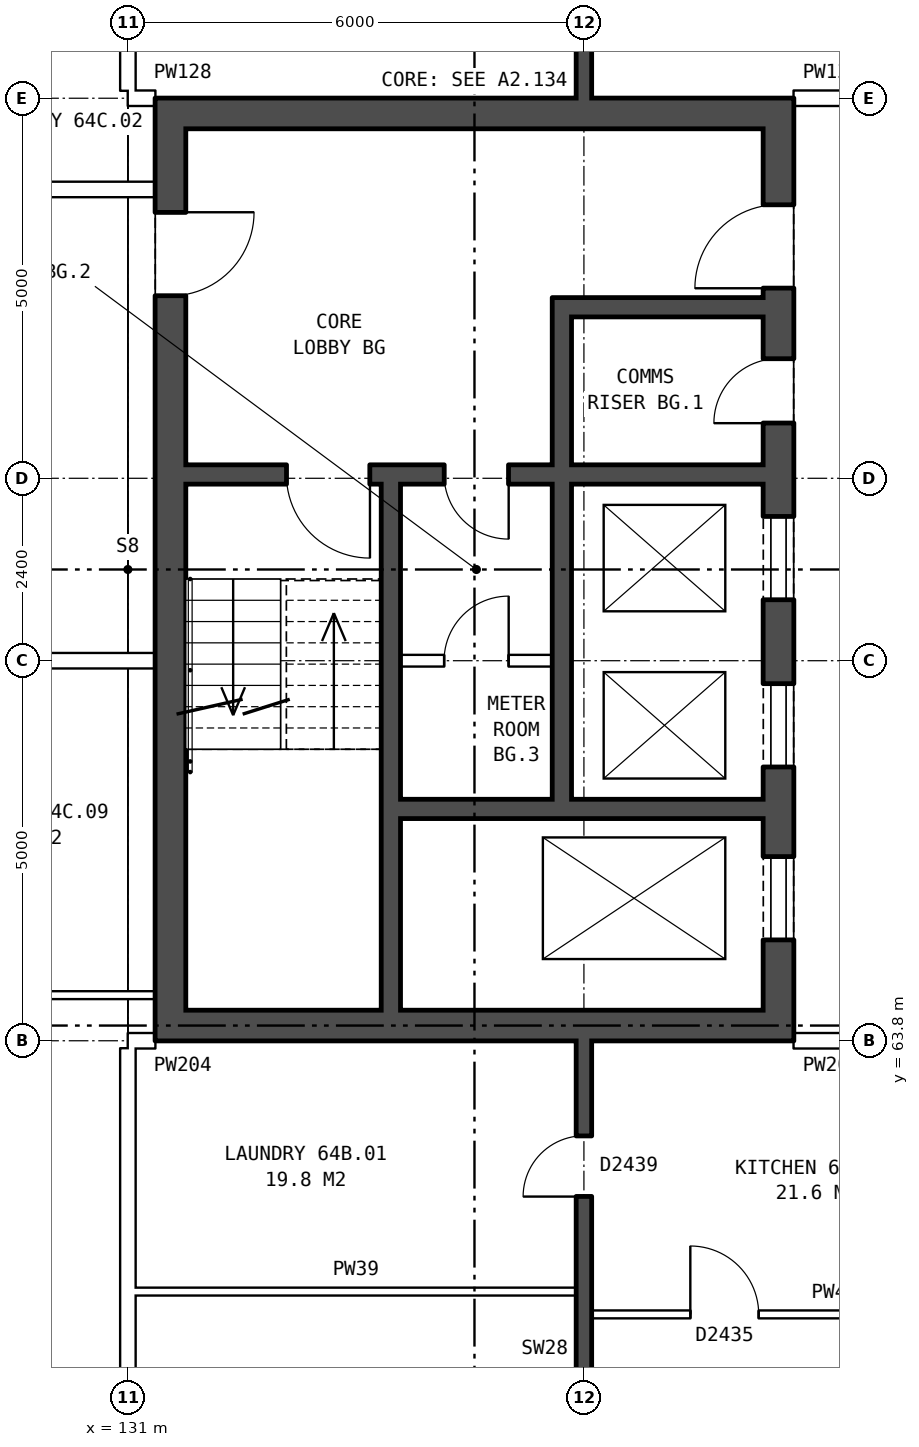
"""IFC4 building model, lengths in metres.
Left out: names, types, materials, properties, quantities, classifications, styles, units other than length and angle.
Written with IfcOpenShell. Run it as: python <this file> out.ifc"""

import sys

from ifc_helpers import new_model, si_unit, direction, frame, frame_2d, origin, place, context, subcontext, project, spatial, rectangle, extrude, element, fill, save


model = new_model("IFC4")
c1 = context("Model", 3, precision=1e-05, world=origin(), true_north=direction((0.0, 1.0)))
c2 = subcontext(c1, "Body", "Model", "MODEL_VIEW")
j1 = project(units=[si_unit("LENGTHUNIT", "METRE"), si_unit("PLANEANGLEUNIT", "RADIAN")], contexts=[c1])
p1 = place(None, origin())
s1 = spatial("IfcSite", under=j1, at=p1, CompositionType="ELEMENT")
p2 = place(p1, origin())
s2 = spatial("IfcBuilding", under=s1, at=p2, CompositionType="ELEMENT")
p3 = place(p2, frame((0.0, 0.0, 227.6)))
s3 = spatial("IfcBuildingStorey", under=s2, at=p3, CompositionType="ELEMENT", Elevation=227.6)
p4 = place(p3, frame((139.56, 63.8, 0.0), z_axis=(0.0, 0.0, 1.0), x_axis=(0.0, 1.0, 0.0)))
e1 = element("IfcWall", 1, at=p4, inside=s3, PredefinedType="SHEAR", context=c2, shape_type="SweptSolid", body=[
    extrude(rectangle(XDim=12.4, YDim=0.4, at=frame_2d((6.2, 0.0))), origin(), (0.0, 0.0, 1.0), 2.85),
])
p5 = place(p4, frame((1.325, 0.0, 0.0)))
e2 = element("IfcOpeningElement", 2, at=p5, cuts=e1, PredefinedType="OPENING", context=c2, shape_type="SweptSolid", body=[
    extrude(rectangle(XDim=1.1, YDim=2.1, at=frame_2d((0.55, 1.05))), frame((0.0, 0.21, 0.0), z_axis=(0.0, -1.0, 0.0), x_axis=(1.0, 0.0, 0.0)), (0.0, 0.0, 1.0), 0.42),
])
p6 = place(p4, frame((3.6, 0.0, 0.0)))
e3 = element("IfcOpeningElement", 3, at=p6, cuts=e1, PredefinedType="OPENING", context=c2, shape_type="SweptSolid", body=[
    extrude(rectangle(XDim=1.1, YDim=2.1, at=frame_2d((0.55, 1.05))), frame((0.0, 0.21, 0.0), z_axis=(0.0, -1.0, 0.0), x_axis=(1.0, 0.0, 0.0)), (0.0, 0.0, 1.0), 0.42),
])
p7 = place(p4, frame((5.8, 0.0, 0.0)))
e4 = element("IfcOpeningElement", 4, at=p7, cuts=e1, PredefinedType="OPENING", context=c2, shape_type="SweptSolid", body=[
    extrude(rectangle(XDim=1.1, YDim=2.1, at=frame_2d((0.55, 1.05))), frame((0.0, 0.21, 0.0), z_axis=(0.0, -1.0, 0.0), x_axis=(1.0, 0.0, 0.0)), (0.0, 0.0, 1.0), 0.42),
])
p8 = place(p4, frame((9.9, 0.0, 0.0)))
e5 = element("IfcOpeningElement", 5, at=p8, cuts=e1, PredefinedType="OPENING", context=c2, shape_type="SweptSolid", body=[
    extrude(rectangle(XDim=1.1, YDim=2.1, at=frame_2d((0.55, 1.05))), frame((0.0, 0.21, 0.0), z_axis=(0.0, -1.0, 0.0), x_axis=(1.0, 0.0, 0.0)), (0.0, 0.0, 1.0), 0.42),
])
p9 = place(p4, frame((8.125, 0.0, 0.0)))
e6 = element("IfcOpeningElement", 6, at=p9, cuts=e1, PredefinedType="OPENING", context=c2, shape_type="SweptSolid", body=[
    extrude(rectangle(XDim=0.85, YDim=2.1, at=frame_2d((0.425, 1.05))), frame((0.0, 0.21, 0.0), z_axis=(0.0, -1.0, 0.0), x_axis=(1.0, 0.0, 0.0)), (0.0, 0.0, 1.0), 0.42),
])
p10 = place(p3, frame((131.56, 63.8, 0.0), z_axis=(0.0, 0.0, 1.0), x_axis=(0.0, 1.0, 0.0)))
e7 = element("IfcWall", 7, at=p10, inside=s3, PredefinedType="SHEAR", context=c2, shape_type="SweptSolid", body=[
    extrude(rectangle(XDim=12.4, YDim=0.4, at=frame_2d((6.2, 0.0))), origin(), (0.0, 0.0, 1.0), 2.85),
])
p11 = place(p10, frame((9.8, 0.0, 0.0)))
e8 = element("IfcOpeningElement", 8, at=p11, cuts=e7, PredefinedType="OPENING", context=c2, shape_type="SweptSolid", body=[
    extrude(rectangle(XDim=1.1, YDim=2.1, at=frame_2d((0.55, 1.05))), frame((0.0, 0.21, 0.0), z_axis=(0.0, -1.0, 0.0), x_axis=(1.0, 0.0, 0.0)), (0.0, 0.0, 1.0), 0.42),
])
for number, where, z_axis, x_axis in (
    (9, (139.36, 64.0, 0.0), (0.0, 0.0, 1.0), (-1.0, 0.0, 0.0)),
    (10, (139.36, 76.0, 0.0), (0.0, 0.0, 1.0), (-1.0, 0.0, 0.0)),
):
    element("IfcWall", number, at=place(p3, frame(where, z_axis=z_axis, x_axis=x_axis)), inside=s3, PredefinedType="SHEAR", context=c2, shape_type="SweptSolid", body=[
        extrude(rectangle(XDim=7.6, YDim=0.4, at=frame_2d((3.8, 0.0))), origin(), (0.0, 0.0, 1.0), 2.85),
    ])
p12 = place(p3, frame((139.36, 66.85, 0.0), z_axis=(0.0, 0.0, 1.0), x_axis=(-1.0, 0.0, 0.0)))
e11 = element("IfcWall", 11, at=p12, inside=s3, PredefinedType="SHEAR", context=c2, shape_type="SweptSolid", body=[
    extrude(rectangle(XDim=4.775, YDim=0.25, at=frame_2d((2.388, 0.0))), origin(), (0.0, 0.0, 1.0), 2.85),
])
p13 = place(p3, frame((136.585, 68.8, 0.0), z_axis=(0.0, 0.0, 1.0), x_axis=(-1.0, 0.0, 0.0)))
e12 = element("IfcWall", 12, at=p13, inside=s3, PredefinedType="PARTITIONING", context=c2, shape_type="SweptSolid", body=[
    extrude(rectangle(XDim=2.0, YDim=0.15, at=frame_2d((1.0, 0.0))), origin(), (0.0, 0.0, 1.0), 2.85),
])
p14 = place(p13, frame((0.575, 0.0, 0.0)))
e13 = element("IfcOpeningElement", 13, at=p14, cuts=e12, PredefinedType="OPENING", context=c2, shape_type="SweptSolid", body=[
    extrude(rectangle(XDim=0.85, YDim=2.1, at=frame_2d((0.425, 1.05))), frame((0.0, 0.085, 0.0), z_axis=(0.0, -1.0, 0.0), x_axis=(1.0, 0.0, 0.0)), (0.0, 0.0, 1.0), 0.17),
])
p15 = place(p3, frame((139.36, 71.25, 0.0), z_axis=(0.0, 0.0, 1.0), x_axis=(-1.0, 0.0, 0.0)))
e14 = element("IfcWall", 14, at=p15, inside=s3, PredefinedType="SHEAR", context=c2, shape_type="SweptSolid", body=[
    extrude(rectangle(XDim=7.6, YDim=0.25, at=frame_2d((3.8, 0.0))), origin(), (0.0, 0.0, 1.0), 2.85),
])
p16 = place(p15, frame((5.175, 0.0, 0.0)))
e15 = element("IfcOpeningElement", 15, at=p16, cuts=e14, PredefinedType="OPENING", context=c2, shape_type="SweptSolid", body=[
    extrude(rectangle(XDim=1.1, YDim=2.1, at=frame_2d((0.55, 1.05))), frame((0.0, 0.135, 0.0), z_axis=(0.0, -1.0, 0.0), x_axis=(1.0, 0.0, 0.0)), (0.0, 0.0, 1.0), 0.27),
])
p17 = place(p15, frame((3.35, 0.0, 0.0)))
e16 = element("IfcOpeningElement", 16, at=p17, cuts=e14, PredefinedType="OPENING", context=c2, shape_type="SweptSolid", body=[
    extrude(rectangle(XDim=0.85, YDim=2.1, at=frame_2d((0.425, 1.05))), frame((0.0, 0.135, 0.0), z_axis=(0.0, -1.0, 0.0), x_axis=(1.0, 0.0, 0.0)), (0.0, 0.0, 1.0), 0.27),
])
p18 = place(p3, frame((139.36, 73.45, 0.0), z_axis=(0.0, 0.0, 1.0), x_axis=(-1.0, 0.0, 0.0)))
e17 = element("IfcWall", 17, at=p18, inside=s3, PredefinedType="SHEAR", context=c2, shape_type="SweptSolid", body=[
    extrude(rectangle(XDim=2.525, YDim=0.25, at=frame_2d((1.263, 0.0))), origin(), (0.0, 0.0, 1.0), 2.85),
])
p19 = place(p3, frame((136.71, 66.975, 0.0), z_axis=(0.0, 0.0, 1.0), x_axis=(0.0, 1.0, 0.0)))
e18 = element("IfcWall", 18, at=p19, inside=s3, PredefinedType="SHEAR", context=c2, shape_type="SweptSolid", body=[
    extrude(rectangle(XDim=4.15, YDim=0.25, at=frame_2d((2.075, 0.0))), origin(), (0.0, 0.0, 1.0), 2.85),
])
p20 = place(p3, frame((136.71, 71.375, 0.0), z_axis=(0.0, 0.0, 1.0), x_axis=(0.0, 1.0, 0.0)))
e19 = element("IfcWall", 19, at=p20, inside=s3, PredefinedType="SHEAR", context=c2, shape_type="SweptSolid", body=[
    extrude(rectangle(XDim=2.2, YDim=0.25, at=frame_2d((1.1, 0.0))), origin(), (0.0, 0.0, 1.0), 2.85),
])
p21 = place(p3, frame((134.46, 64.2, 0.0), z_axis=(0.0, 0.0, 1.0), x_axis=(0.0, 1.0, 0.0)))
e20 = element("IfcWall", 20, at=p21, inside=s3, PredefinedType="SHEAR", context=c2, shape_type="SweptSolid", body=[
    extrude(rectangle(XDim=6.925, YDim=0.25, at=frame_2d((3.462, 0.0))), origin(), (0.0, 0.0, 1.0), 2.85),
])
p22 = place(p3, frame((137.1, 60.2, 0.0), z_axis=(0.0, 0.0, 1.0), x_axis=(1.0, 0.0, 0.0)))
e21 = element("IfcWall", 21, at=p22, inside=s3, PredefinedType="PARTITIONING", context=c2, shape_type="SweptSolid", body=[
    extrude(rectangle(XDim=5.8, YDim=0.1, at=frame_2d((2.9, 0.0))), origin(), (0.0, 0.0, 1.0), 2.85),
])
p23 = place(p22, frame((1.3, 0.0, 0.0)))
e22 = element("IfcOpeningElement", 22, at=p23, cuts=e21, PredefinedType="OPENING", context=c2, shape_type="SweptSolid", body=[
    extrude(rectangle(XDim=0.9, YDim=2.1, at=frame_2d((0.45, 1.05))), frame((0.0, 0.06, 0.0), z_axis=(0.0, -1.0, 0.0), x_axis=(1.0, 0.0, 0.0)), (0.0, 0.0, 1.0), 0.12),
])
p24 = place(p22, frame((4.2, 0.0, 0.0)))
e23 = element("IfcOpeningElement", 23, at=p24, cuts=e21, PredefinedType="OPENING", context=c2, shape_type="SweptSolid", body=[
    extrude(rectangle(XDim=0.9, YDim=2.1, at=frame_2d((0.45, 1.05))), frame((0.0, 0.06, 0.0), z_axis=(0.0, -1.0, 0.0), x_axis=(1.0, 0.0, 0.0)), (0.0, 0.0, 1.0), 0.12),
])
p25 = place(p3, frame((131.1, 60.5, 0.0), z_axis=(0.0, 0.0, 1.0), x_axis=(1.0, 0.0, 0.0)))
e24 = element("IfcWall", 24, at=p25, inside=s3, PredefinedType="PARTITIONING", context=c2, shape_type="SweptSolid", body=[
    extrude(rectangle(XDim=5.8, YDim=0.1, at=frame_2d((2.9, 0.0))), origin(), (0.0, 0.0, 1.0), 2.85),
])
p26 = place(p3, frame((131.0, 63.8, 0.0), z_axis=(0.0, 0.0, 1.0), x_axis=(1.0, 0.0, 0.0)))
e25 = element("IfcWall", 25, at=p26, inside=s3, PredefinedType="PARTITIONING", context=c2, shape_type="SweptSolid", body=[
    extrude(rectangle(XDim=0.36, YDim=0.2, at=frame_2d((0.18, 0.0))), origin(), (0.0, 0.0, 1.0), 2.85),
])
p27 = place(p3, frame((139.76, 63.8, 0.0), z_axis=(0.0, 0.0, 1.0), x_axis=(1.0, 0.0, 0.0)))
e26 = element("IfcWall", 26, at=p27, inside=s3, PredefinedType="PARTITIONING", context=c2, shape_type="SweptSolid", body=[
    extrude(rectangle(XDim=3.0, YDim=0.2, at=frame_2d((1.5, 0.0))), origin(), (0.0, 0.0, 1.0), 2.85),
])
p28 = place(p27, frame((1.0, 0.0, 0.0)))
e27 = element("IfcOpeningElement", 27, at=p28, cuts=e26, PredefinedType="OPENING", context=c2, shape_type="SweptSolid", body=[
    extrude(rectangle(XDim=1.0, YDim=2.1, at=frame_2d((0.5, 1.05))), frame((0.0, 0.11, 0.0), z_axis=(0.0, -1.0, 0.0), x_axis=(1.0, 0.0, 0.0)), (0.0, 0.0, 1.0), 0.22),
])
p29 = place(p3, frame((127.912, 64.4, 0.0), z_axis=(0.0, 0.0, 1.0), x_axis=(1.0, 0.0, 0.0)))
e28 = element("IfcWall", 28, at=p29, inside=s3, PredefinedType="PARTITIONING", context=c2, shape_type="SweptSolid", body=[
    extrude(rectangle(XDim=3.448, YDim=0.1, at=frame_2d((1.724, 0.0))), origin(), (0.0, 0.0, 1.0), 2.85),
])
p30 = place(p3, frame((75.64, 68.8, 0.0), z_axis=(0.0, 0.0, 1.0), x_axis=(1.0, 0.0, 0.0)))
e29 = element("IfcWall", 29, at=p30, inside=s3, PredefinedType="PARTITIONING", context=c2, shape_type="SweptSolid", body=[
    extrude(rectangle(XDim=55.72, YDim=0.2, at=frame_2d((27.86, 0.0))), origin(), (0.0, 0.0, 1.0), 2.85),
])
p31 = place(p30, frame((1.399, 0.0, 0.0)))
e30 = element("IfcOpeningElement", 30, at=p31, cuts=e29, PredefinedType="OPENING", context=c2, shape_type="SweptSolid", body=[
    extrude(rectangle(XDim=1.0, YDim=2.1, at=frame_2d((0.5, 1.05))), frame((0.0, 0.11, 0.0), z_axis=(0.0, -1.0, 0.0), x_axis=(1.0, 0.0, 0.0)), (0.0, 0.0, 1.0), 0.22),
])
p32 = place(p30, frame((12.241, 0.0, 0.0)))
e31 = element("IfcOpeningElement", 31, at=p32, cuts=e29, PredefinedType="OPENING", context=c2, shape_type="SweptSolid", body=[
    extrude(rectangle(XDim=1.0, YDim=2.1, at=frame_2d((0.5, 1.05))), frame((0.0, 0.11, 0.0), z_axis=(0.0, -1.0, 0.0), x_axis=(1.0, 0.0, 0.0)), (0.0, 0.0, 1.0), 0.22),
])
p33 = place(p30, frame((22.553, 0.0, 0.0)))
e32 = element("IfcOpeningElement", 32, at=p33, cuts=e29, PredefinedType="OPENING", context=c2, shape_type="SweptSolid", body=[
    extrude(rectangle(XDim=1.0, YDim=2.1, at=frame_2d((0.5, 1.05))), frame((0.0, 0.11, 0.0), z_axis=(0.0, -1.0, 0.0), x_axis=(1.0, 0.0, 0.0)), (0.0, 0.0, 1.0), 0.22),
])
p34 = place(p30, frame((32.866, 0.0, 0.0)))
e33 = element("IfcOpeningElement", 33, at=p34, cuts=e29, PredefinedType="OPENING", context=c2, shape_type="SweptSolid", body=[
    extrude(rectangle(XDim=1.0, YDim=2.1, at=frame_2d((0.5, 1.05))), frame((0.0, 0.11, 0.0), z_axis=(0.0, -1.0, 0.0), x_axis=(1.0, 0.0, 0.0)), (0.0, 0.0, 1.0), 0.22),
])
p35 = place(p30, frame((36.303, 0.0, 0.0)))
e34 = element("IfcOpeningElement", 34, at=p35, cuts=e29, PredefinedType="OPENING", context=c2, shape_type="SweptSolid", body=[
    extrude(rectangle(XDim=1.0, YDim=2.1, at=frame_2d((0.5, 1.05))), frame((0.0, 0.11, 0.0), z_axis=(0.0, -1.0, 0.0), x_axis=(1.0, 0.0, 0.0)), (0.0, 0.0, 1.0), 0.22),
])
p36 = place(p30, frame((46.616, 0.0, 0.0)))
e35 = element("IfcOpeningElement", 35, at=p36, cuts=e29, PredefinedType="OPENING", context=c2, shape_type="SweptSolid", body=[
    extrude(rectangle(XDim=1.0, YDim=2.1, at=frame_2d((0.5, 1.05))), frame((0.0, 0.11, 0.0), z_axis=(0.0, -1.0, 0.0), x_axis=(1.0, 0.0, 0.0)), (0.0, 0.0, 1.0), 0.22),
])
p37 = place(p30, frame((50.053, 0.0, 0.0)))
e36 = element("IfcOpeningElement", 36, at=p37, cuts=e29, PredefinedType="OPENING", context=c2, shape_type="SweptSolid", body=[
    extrude(rectangle(XDim=1.0, YDim=2.1, at=frame_2d((0.5, 1.05))), frame((0.0, 0.11, 0.0), z_axis=(0.0, -1.0, 0.0), x_axis=(1.0, 0.0, 0.0)), (0.0, 0.0, 1.0), 0.22),
])
p38 = place(p3, frame((124.475, 75.0, 0.0), z_axis=(0.0, 0.0, 1.0), x_axis=(1.0, 0.0, 0.0)))
e37 = element("IfcWall", 37, at=p38, inside=s3, PredefinedType="PARTITIONING", context=c2, shape_type="SweptSolid", body=[
    extrude(rectangle(XDim=6.885, YDim=0.2, at=frame_2d((3.442, 0.0))), origin(), (0.0, 0.0, 1.0), 2.85),
])
p39 = place(p38, frame((2.992, 0.0, 0.0)))
e38 = element("IfcOpeningElement", 38, at=p39, cuts=e37, PredefinedType="OPENING", context=c2, shape_type="SweptSolid", body=[
    extrude(rectangle(XDim=0.9, YDim=2.1, at=frame_2d((0.45, 1.05))), frame((0.0, 0.11, 0.0), z_axis=(0.0, -1.0, 0.0), x_axis=(1.0, 0.0, 0.0)), (0.0, 0.0, 1.0), 0.22),
])
p40 = place(p3, frame((131.0, 76.2, 0.0), z_axis=(0.0, 0.0, 1.0), x_axis=(1.0, 0.0, 0.0)))
e39 = element("IfcWall", 39, at=p40, inside=s3, PredefinedType="PARTITIONING", context=c2, shape_type="SweptSolid", body=[
    extrude(rectangle(XDim=0.36, YDim=0.2, at=frame_2d((0.18, 0.0))), origin(), (0.0, 0.0, 1.0), 2.85),
])
p41 = place(p3, frame((139.76, 76.2, 0.0), z_axis=(0.0, 0.0, 1.0), x_axis=(1.0, 0.0, 0.0)))
e40 = element("IfcWall", 40, at=p41, inside=s3, PredefinedType="PARTITIONING", context=c2, shape_type="SweptSolid", body=[
    extrude(rectangle(XDim=3.0, YDim=0.2, at=frame_2d((1.5, 0.0))), origin(), (0.0, 0.0, 1.0), 2.85),
])
p42 = place(p41, frame((1.0, 0.0, 0.0)))
e41 = element("IfcOpeningElement", 41, at=p42, cuts=e40, PredefinedType="OPENING", context=c2, shape_type="SweptSolid", body=[
    extrude(rectangle(XDim=1.0, YDim=2.1, at=frame_2d((0.5, 1.05))), frame((0.0, 0.11, 0.0), z_axis=(0.0, -1.0, 0.0), x_axis=(1.0, 0.0, 0.0)), (0.0, 0.0, 1.0), 0.22),
])
for number, where, z_axis, x_axis in (
    (42, (131.0, 54.36, 0.0), (0.0, 0.0, 1.0), (0.0, 1.0, 0.0)),
    (43, (131.0, 76.3, 0.0), (0.0, 0.0, 1.0), (0.0, 1.0, 0.0)),
):
    element("IfcWall", number, at=place(p3, frame(where, z_axis=z_axis, x_axis=x_axis)), inside=s3, PredefinedType="PARTITIONING", context=c2, shape_type="SweptSolid", body=[
        extrude(rectangle(XDim=9.34, YDim=0.2, at=frame_2d((4.67, 0.0))), origin(), (0.0, 0.0, 1.0), 2.85),
    ])
p43 = place(p3, frame((137.0, 54.36, 0.0), z_axis=(0.0, 0.0, 1.0), x_axis=(0.0, 1.0, 0.0)))
e44 = element("IfcWall", 44, at=p43, inside=s3, PredefinedType="SOLIDWALL", context=c2, shape_type="SweptSolid", body=[
    extrude(rectangle(XDim=9.44, YDim=0.2, at=frame_2d((4.72, 0.0))), origin(), (0.0, 0.0, 1.0), 2.85),
])
p44 = place(p43, frame((2.47, 0.0, 0.0)))
e45 = element("IfcOpeningElement", 45, at=p44, cuts=e44, PredefinedType="OPENING", context=c2, shape_type="SweptSolid", body=[
    extrude(rectangle(XDim=0.9, YDim=2.1, at=frame_2d((0.45, 1.05))), frame((0.0, 0.11, 0.0), z_axis=(0.0, -1.0, 0.0), x_axis=(1.0, 0.0, 0.0)), (0.0, 0.0, 1.0), 0.22),
])
p45 = place(p43, frame((7.39, 0.0, 0.0)))
e46 = element("IfcOpeningElement", 46, at=p45, cuts=e44, PredefinedType="OPENING", context=c2, shape_type="SweptSolid", body=[
    extrude(rectangle(XDim=0.8, YDim=2.1, at=frame_2d((0.4, 1.05))), frame((0.0, 0.11, 0.0), z_axis=(0.0, -1.0, 0.0), x_axis=(1.0, 0.0, 0.0)), (0.0, 0.0, 1.0), 0.22),
])
p46 = place(p3, frame((137.0, 76.2, 0.0), z_axis=(0.0, 0.0, 1.0), x_axis=(0.0, 1.0, 0.0)))
e47 = element("IfcWall", 47, at=p46, inside=s3, PredefinedType="SOLIDWALL", context=c2, shape_type="SweptSolid", body=[
    extrude(rectangle(XDim=9.44, YDim=0.2, at=frame_2d((4.72, 0.0))), origin(), (0.0, 0.0, 1.0), 2.85),
])
p47 = place(p46, frame((5.92, 0.0, 0.0)))
e48 = element("IfcOpeningElement", 48, at=p47, cuts=e47, PredefinedType="OPENING", context=c2, shape_type="SweptSolid", body=[
    extrude(rectangle(XDim=0.9, YDim=2.1, at=frame_2d((0.45, 1.05))), frame((0.0, 0.11, 0.0), z_axis=(0.0, -1.0, 0.0), x_axis=(1.0, 0.0, 0.0)), (0.0, 0.0, 1.0), 0.22),
])
p48 = place(p46, frame((1.25, 0.0, 0.0)))
e49 = element("IfcOpeningElement", 49, at=p48, cuts=e47, PredefinedType="OPENING", context=c2, shape_type="SweptSolid", body=[
    extrude(rectangle(XDim=0.8, YDim=2.1, at=frame_2d((0.4, 1.05))), frame((0.0, 0.11, 0.0), z_axis=(0.0, -1.0, 0.0), x_axis=(1.0, 0.0, 0.0)), (0.0, 0.0, 1.0), 0.22),
])
p49 = place(p5, origin())
e50 = element("IfcDoor", 50, at=p49, inside=s3, OperationType="DOUBLE_DOOR_SLIDING", PredefinedType="DOOR", context=c2, shape_type="SweptSolid", body=[
    extrude(rectangle(XDim=1.1, YDim=2.1, at=frame_2d((0.55, 1.05))), frame((0.0, 0.185, 0.0), z_axis=(0.0, -1.0, 0.0), x_axis=(1.0, 0.0, 0.0)), (0.0, 0.0, 1.0), 0.05),
])
fill(e2, e50)
p50 = place(p6, origin())
e51 = element("IfcDoor", 51, at=p50, inside=s3, OperationType="DOUBLE_DOOR_SLIDING", PredefinedType="DOOR", context=c2, shape_type="SweptSolid", body=[
    extrude(rectangle(XDim=1.1, YDim=2.1, at=frame_2d((0.55, 1.05))), frame((0.0, 0.185, 0.0), z_axis=(0.0, -1.0, 0.0), x_axis=(1.0, 0.0, 0.0)), (0.0, 0.0, 1.0), 0.05),
])
fill(e3, e51)
p51 = place(p7, origin())
e52 = element("IfcDoor", 52, at=p51, inside=s3, OperationType="DOUBLE_DOOR_SLIDING", PredefinedType="DOOR", context=c2, shape_type="SweptSolid", body=[
    extrude(rectangle(XDim=1.1, YDim=2.1, at=frame_2d((0.55, 1.05))), frame((0.0, 0.185, 0.0), z_axis=(0.0, -1.0, 0.0), x_axis=(1.0, 0.0, 0.0)), (0.0, 0.0, 1.0), 0.05),
])
fill(e4, e52)
p52 = place(p8, origin())
e53 = element("IfcDoor", 53, at=p52, inside=s3, OperationType="SINGLE_SWING_LEFT", PredefinedType="DOOR", context=c2, shape_type="SweptSolid", body=[
    extrude(rectangle(XDim=1.1, YDim=2.1, at=frame_2d((0.55, 1.05))), frame((0.0, 0.185, 0.0), z_axis=(0.0, -1.0, 0.0), x_axis=(1.0, 0.0, 0.0)), (0.0, 0.0, 1.0), 0.05),
])
fill(e5, e53)
p53 = place(p16, origin())
e54 = element("IfcDoor", 54, at=p53, inside=s3, OperationType="SINGLE_SWING_LEFT", PredefinedType="DOOR", context=c2, shape_type="SweptSolid", body=[
    extrude(rectangle(XDim=1.1, YDim=2.1, at=frame_2d((0.55, 1.05))), frame((0.0, 0.025, 0.0), z_axis=(0.0, -1.0, 0.0), x_axis=(1.0, 0.0, 0.0)), (0.0, 0.0, 1.0), 0.05),
])
fill(e15, e54)
p54 = place(p9, origin())
e55 = element("IfcDoor", 55, at=p54, inside=s3, OperationType="SINGLE_SWING_LEFT", PredefinedType="DOOR", context=c2, shape_type="SweptSolid", body=[
    extrude(rectangle(XDim=0.85, YDim=2.1, at=frame_2d((0.425, 1.05))), frame((0.0, 0.185, 0.0), z_axis=(0.0, -1.0, 0.0), x_axis=(1.0, 0.0, 0.0)), (0.0, 0.0, 1.0), 0.05),
])
fill(e6, e55)
p55 = place(p17, origin())
e56 = element("IfcDoor", 56, at=p55, inside=s3, OperationType="SINGLE_SWING_LEFT", PredefinedType="DOOR", context=c2, shape_type="SweptSolid", body=[
    extrude(rectangle(XDim=0.85, YDim=2.1, at=frame_2d((0.425, 1.05))), frame((0.0, 0.025, 0.0), z_axis=(0.0, -1.0, 0.0), x_axis=(1.0, 0.0, 0.0)), (0.0, 0.0, 1.0), 0.05),
])
fill(e16, e56)
p56 = place(p14, frame((0.85, 0.0, 0.0), z_axis=(0.0, 0.0, 1.0), x_axis=(-1.0, 0.0, 0.0)))
e57 = element("IfcDoor", 57, at=p56, inside=s3, OperationType="SINGLE_SWING_RIGHT", PredefinedType="DOOR", context=c2, shape_type="SweptSolid", body=[
    extrude(rectangle(XDim=0.85, YDim=2.1, at=frame_2d((0.425, 1.05))), frame((0.0, 0.025, 0.0), z_axis=(0.0, -1.0, 0.0), x_axis=(1.0, 0.0, 0.0)), (0.0, 0.0, 1.0), 0.05),
])
fill(e13, e57)
p57 = place(p11, frame((1.1, 0.0, 0.0), z_axis=(0.0, 0.0, 1.0), x_axis=(-1.0, 0.0, 0.0)))
e58 = element("IfcDoor", 58, at=p57, inside=s3, OperationType="SINGLE_SWING_LEFT", PredefinedType="DOOR", context=c2, shape_type="SweptSolid", body=[
    extrude(rectangle(XDim=1.1, YDim=2.1, at=frame_2d((0.55, 1.05))), frame((0.0, 0.185, 0.0), z_axis=(0.0, -1.0, 0.0), x_axis=(1.0, 0.0, 0.0)), (0.0, 0.0, 1.0), 0.05),
])
fill(e8, e58)
p58 = place(p23, origin())
e59 = element("IfcDoor", 59, at=p58, inside=s3, OperationType="SINGLE_SWING_LEFT", PredefinedType="DOOR", context=c2, shape_type="SweptSolid", body=[
    extrude(rectangle(XDim=0.9, YDim=2.1, at=frame_2d((0.45, 1.05))), frame((0.0, 0.025, 0.0), z_axis=(0.0, -1.0, 0.0), x_axis=(1.0, 0.0, 0.0)), (0.0, 0.0, 1.0), 0.05),
])
fill(e22, e59)
p59 = place(p45, origin())
e60 = element("IfcDoor", 60, at=p59, inside=s3, OperationType="SINGLE_SWING_LEFT", PredefinedType="DOOR", context=c2, shape_type="SweptSolid", body=[
    extrude(rectangle(XDim=0.8, YDim=2.1, at=frame_2d((0.4, 1.05))), frame((0.0, 0.025, 0.0), z_axis=(0.0, -1.0, 0.0), x_axis=(1.0, 0.0, 0.0)), (0.0, 0.0, 1.0), 0.05),
])
fill(e46, e60)
save(model, sys.argv[1])
